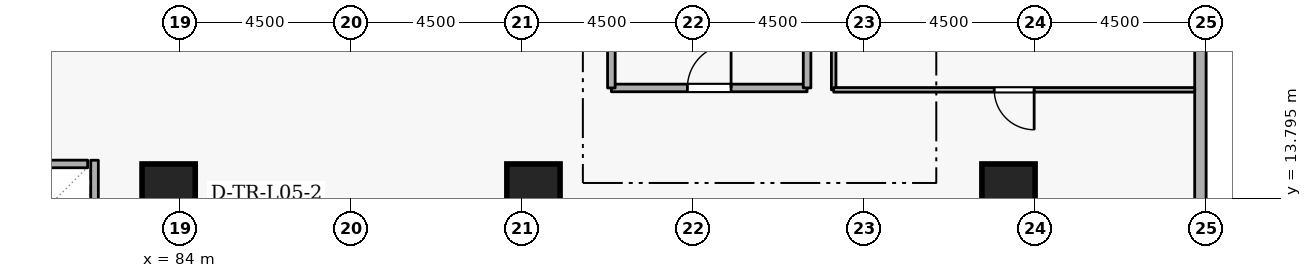
"""IFC4 building model, lengths in metres.
Left out: names, types, materials, properties, quantities, classifications, styles, units other than length and angle.
Written with IfcOpenShell. Run it as: python <this file> out.ifc"""

import sys

from ifc_helpers import new_model, si_unit, direction, frame, frame_2d, origin, origin_2d, place, context, subcontext, project, spatial, rectangle, extrude, element, fill, save


model = new_model("IFC4")
c1 = context("Model", 3, precision=1e-05, world=origin(), true_north=direction((0.0, 1.0)))
c2 = subcontext(c1, "Body", "Model", "MODEL_VIEW")
j1 = project(units=[si_unit("LENGTHUNIT", "METRE"), si_unit("PLANEANGLEUNIT", "RADIAN")], contexts=[c1])
p1 = place(None, origin())
s1 = spatial("IfcSite", under=j1, at=p1, CompositionType="ELEMENT")
p2 = place(p1, origin())
s2 = spatial("IfcBuilding", under=s1, at=p2, CompositionType="ELEMENT")
p3 = place(p2, frame((0.0, 0.0, 23.1)))
s3 = spatial("IfcBuildingStorey", under=s2, at=p3, CompositionType="ELEMENT", Elevation=23.1)
for number, where, z_axis, x_axis in (
    (1, (105.8, 14.0, 0.0), (0.0, 0.0, 1.0), (1.0, 0.0, 0.0)),
    (2, (93.3, 14.0, 0.0), (0.0, 0.0, 1.0), (1.0, 0.0, 0.0)),
    (3, (83.7, 14.0, 0.0), (0.0, 0.0, 1.0), (1.0, 0.0, 0.0)),
):
    element("IfcColumn", number, at=place(p3, frame(where, z_axis=z_axis, x_axis=x_axis)), inside=s3, PredefinedType="COLUMN", context=c2, shape_type="SweptSolid", body=[
        extrude(rectangle(XDim=1.4, YDim=1.4, at=origin_2d()), origin(), (0.0, 0.0, 1.0), 4.8),
    ])
p4 = place(p3, frame((110.85, 12.32, 0.0), z_axis=(0.0, 0.0, 1.0), x_axis=(0.0, 1.0, 0.0)))
e4 = element("IfcWall", 4, at=p4, inside=s3, PredefinedType="STANDARD", context=c2, shape_type="SweptSolid", body=[
    extrude(rectangle(XDim=36.86, YDim=0.3, at=frame_2d((18.43, 0.0))), origin(), (0.0, 0.0, 1.0), 2.84),
])
p5 = place(p3, frame((79.63, 14.7, 0.0), z_axis=(0.0, 0.0, 1.0), x_axis=(1.0, 0.0, 0.0)))
e5 = element("IfcWall", 5, at=p5, inside=s3, PredefinedType="STANDARD", context=c2, shape_type="SweptSolid", body=[
    extrude(rectangle(XDim=1.94, YDim=0.2, at=frame_2d((0.97, 0.0))), origin(), (0.0, 0.0, 1.0), 4.54),
])
p6 = place(p3, frame((81.75, 12.502, 0.0), z_axis=(0.0, 0.0, 1.0), x_axis=(0.0, 1.0, 0.0)))
e6 = element("IfcWall", 6, at=p6, inside=s3, PredefinedType="STANDARD", context=c2, shape_type="SweptSolid", body=[
    extrude(rectangle(XDim=2.296, YDim=0.2, at=frame_2d((1.148, 0.0))), origin(), (0.0, 0.0, 1.0), 4.54),
])
p7 = place(p3, frame((95.35, 16.7, 0.0), z_axis=(0.0, 0.0, 1.0), x_axis=(1.0, 0.0, 0.0)))
e7 = element("IfcWall", 7, at=p7, inside=s3, PredefinedType="STANDARD", context=c2, shape_type="SweptSolid", body=[
    extrude(rectangle(XDim=5.15, YDim=0.2, at=frame_2d((2.575, 0.0))), origin(), (0.0, 0.0, 1.0), 4.54),
])
p8 = place(p7, frame((2.0, 0.0, 0.0)))
e8 = element("IfcOpeningElement", 8, at=p8, cuts=e7, PredefinedType="OPENING", context=c2, shape_type="SweptSolid", body=[
    extrude(rectangle(XDim=1.15, YDim=2.1, at=frame_2d((0.575, 1.05))), frame((0.0, 0.11, 0.0), z_axis=(0.0, -1.0, 0.0), x_axis=(1.0, 0.0, 0.0)), (0.0, 0.0, 1.0), 0.22),
])
for number, where, z_axis, x_axis in (
    (9, (100.5, 16.7, 0.0), (0.0, 0.0, 1.0), (0.0, 1.0, 0.0)),
    (10, (95.35, 19.2, 0.0), (0.0, 0.0, 1.0), (0.0, -1.0, 0.0)),
):
    element("IfcWall", number, at=place(p3, frame(where, z_axis=z_axis, x_axis=x_axis)), inside=s3, PredefinedType="STANDARD", context=c2, shape_type="SweptSolid", body=[
        extrude(rectangle(XDim=2.5, YDim=0.2, at=frame_2d((1.25, 0.0))), origin(), (0.0, 0.0, 1.0), 4.54),
    ])
p9 = place(p3, frame((101.2, 16.65, 0.0), z_axis=(0.0, 0.0, 1.0), x_axis=(0.0, 1.0, 0.0)))
e11 = element("IfcWall", 11, at=p9, inside=s3, PredefinedType="PARTITIONING", context=c2, shape_type="SweptSolid", body=[
    extrude(rectangle(XDim=10.35, YDim=0.12, at=frame_2d((5.175, 0.0))), origin(), (0.0, 0.0, 1.0), 2.885),
])
p10 = place(p3, frame((110.7, 16.65, 0.0), z_axis=(0.0, 0.0, 1.0), x_axis=(-1.0, 0.0, 0.0)))
e12 = element("IfcWall", 12, at=p10, inside=s3, PredefinedType="PARTITIONING", context=c2, shape_type="SweptSolid", body=[
    extrude(rectangle(XDim=9.5, YDim=0.12, at=frame_2d((4.75, 0.0))), origin(), (0.0, 0.0, 1.0), 4.54),
])
p11 = place(p10, frame((4.225, 0.0, 0.0)))
e13 = element("IfcOpeningElement", 13, at=p11, cuts=e12, PredefinedType="OPENING", context=c2, shape_type="SweptSolid", body=[
    extrude(rectangle(XDim=1.05, YDim=2.1, at=frame_2d((0.525, 1.05))), frame((0.0, 0.07, 0.0), z_axis=(0.0, -1.0, 0.0), x_axis=(1.0, 0.0, 0.0)), (0.0, 0.0, 1.0), 0.14),
])
p12 = place(p8, origin())
e14 = element("IfcDoor", 14, at=p12, inside=s3, OperationType="SINGLE_SWING_RIGHT", PredefinedType="DOOR", context=c2, shape_type="SweptSolid", body=[
    extrude(rectangle(XDim=1.15, YDim=2.1, at=frame_2d((0.575, 1.05))), frame((0.0, 0.025, 0.0), z_axis=(0.0, -1.0, 0.0), x_axis=(1.0, 0.0, 0.0)), (0.0, 0.0, 1.0), 0.05),
])
fill(e8, e14)
p13 = place(p11, origin())
e15 = element("IfcDoor", 15, at=p13, inside=s3, OperationType="SINGLE_SWING_LEFT", PredefinedType="DOOR", context=c2, shape_type="SweptSolid", body=[
    extrude(rectangle(XDim=1.05, YDim=2.1, at=frame_2d((0.525, 1.05))), frame((0.0, 0.025, 0.0), z_axis=(0.0, -1.0, 0.0), x_axis=(1.0, 0.0, 0.0)), (0.0, 0.0, 1.0), 0.05),
])
fill(e13, e15)
save(model, sys.argv[1])
